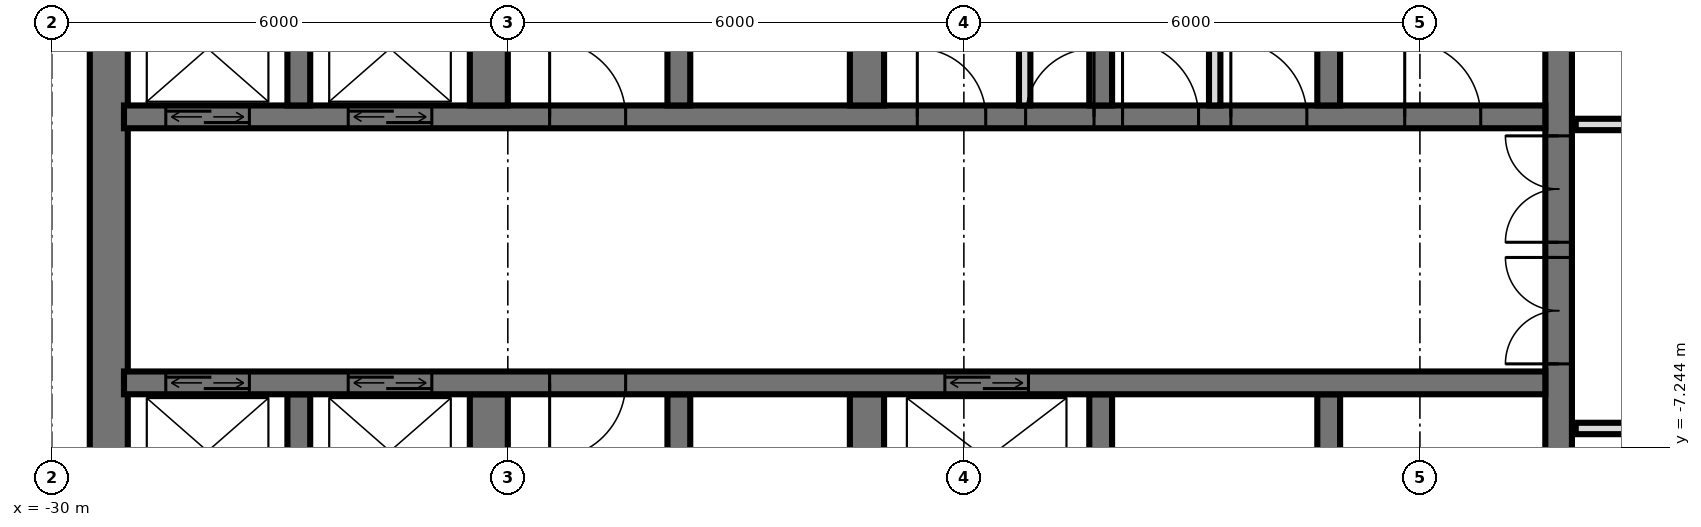
"""IFC4 building model, lengths in metres.
Left out: names, types, materials, properties, quantities, classifications, styles, units other than length and angle.
Written with IfcOpenShell. Run it as: python <this file> out.ifc"""

import sys

from ifc_helpers import new_model, si_unit, direction, frame, frame_2d, origin, place, context, subcontext, project, spatial, rectangle, extrude, element, fill, save


model = new_model("IFC4")
c1 = context("Model", 3, precision=1e-05, world=origin(), true_north=direction((0.0, 1.0)))
c2 = subcontext(c1, "Body", "Model", "MODEL_VIEW")
j1 = project(units=[si_unit("LENGTHUNIT", "METRE"), si_unit("PLANEANGLEUNIT", "RADIAN")], contexts=[c1])
p1 = place(None, origin())
s1 = spatial("IfcSite", under=j1, at=p1, CompositionType="ELEMENT")
p2 = place(p1, origin())
s2 = spatial("IfcBuilding", under=s1, at=p2, CompositionType="ELEMENT")
p3 = place(p2, frame((0.0, 0.0, 31.2)))
s3 = spatial("IfcBuildingStorey", under=s2, at=p3, CompositionType="ELEMENT", Elevation=31.2)
p4 = place(p3, frame((-10.175, -14.55, 0.0), z_axis=(0.0, 0.0, 1.0), x_axis=(0.0, 1.0, 0.0)))
e1 = element("IfcWall", 1, at=p4, inside=s3, PredefinedType="SHEAR", context=c2, shape_type="SweptSolid", body=[
    extrude(rectangle(XDim=14.1, YDim=0.35, at=frame_2d((7.05, 0.0))), origin(), (0.0, 0.0, 1.0), 3.6),
])
p5 = place(p4, frame((8.4, 0.0, 0.0)))
e2 = element("IfcOpeningElement", 2, at=p5, cuts=e1, PredefinedType="OPENING", context=c2, shape_type="SweptSolid", body=[
    extrude(rectangle(XDim=1.4, YDim=2.4, at=frame_2d((0.7, 1.2))), frame((0.0, 0.185, 0.0), z_axis=(0.0, -1.0, 0.0), x_axis=(1.0, 0.0, 0.0)), (0.0, 0.0, 1.0), 0.37),
])
p6 = place(p4, frame((10.0, 0.0, 0.0)))
e3 = element("IfcOpeningElement", 3, at=p6, cuts=e1, PredefinedType="OPENING", context=c2, shape_type="SweptSolid", body=[
    extrude(rectangle(XDim=1.4, YDim=2.4, at=frame_2d((0.7, 1.2))), frame((0.0, 0.185, 0.0), z_axis=(0.0, -1.0, 0.0), x_axis=(1.0, 0.0, 0.0)), (0.0, 0.0, 1.0), 0.37),
])
p7 = place(p4, frame((4.0, 0.0, 0.0)))
e4 = element("IfcOpeningElement", 4, at=p7, cuts=e1, PredefinedType="OPENING", context=c2, shape_type="SweptSolid", body=[
    extrude(rectangle(XDim=1.2, YDim=2.1, at=frame_2d((0.6, 1.05))), frame((0.0, 0.185, 0.0), z_axis=(0.0, -1.0, 0.0), x_axis=(1.0, 0.0, 0.0)), (0.0, 0.0, 1.0), 0.37),
])
p8 = place(p3, frame((-29.25, -14.55, 0.0), z_axis=(0.0, 0.0, 1.0), x_axis=(0.0, 1.0, 0.0)))
e5 = element("IfcWall", 5, at=p8, inside=s3, PredefinedType="SHEAR", context=c2, shape_type="SweptSolid", body=[
    extrude(rectangle(XDim=14.1, YDim=0.5, at=frame_2d((7.05, 0.0))), origin(), (0.0, 0.0, 1.0), 3.6),
])
p9 = place(p3, frame((-29.05, -2.9, 0.0), z_axis=(0.0, 0.0, 1.0), x_axis=(1.0, 0.0, 0.0)))
e6 = element("IfcWall", 6, at=p9, inside=s3, PredefinedType="SHEAR", context=c2, shape_type="SweptSolid", body=[
    extrude(rectangle(XDim=18.7, YDim=0.3, at=frame_2d((9.35, 0.0))), origin(), (0.0, 0.0, 1.0), 3.6),
])
p10 = place(p9, frame((2.95, 0.0, 0.0)))
e7 = element("IfcOpeningElement", 7, at=p10, cuts=e6, PredefinedType="OPENING", context=c2, shape_type="SweptSolid", body=[
    extrude(rectangle(XDim=1.1, YDim=2.1, at=frame_2d((0.55, 1.05))), frame((0.0, 0.16, 0.0), z_axis=(0.0, -1.0, 0.0), x_axis=(1.0, 0.0, 0.0)), (0.0, 0.0, 1.0), 0.32),
])
p11 = place(p9, frame((0.55, 0.0, 0.0)))
e8 = element("IfcOpeningElement", 8, at=p11, cuts=e6, PredefinedType="OPENING", context=c2, shape_type="SweptSolid", body=[
    extrude(rectangle(XDim=1.1, YDim=2.1, at=frame_2d((0.55, 1.05))), frame((0.0, 0.16, 0.0), z_axis=(0.0, -1.0, 0.0), x_axis=(1.0, 0.0, 0.0)), (0.0, 0.0, 1.0), 0.32),
])
p12 = place(p9, frame((11.863, 0.0, 0.0)))
e9 = element("IfcOpeningElement", 9, at=p12, cuts=e6, PredefinedType="OPENING", context=c2, shape_type="SweptSolid", body=[
    extrude(rectangle(XDim=0.9, YDim=2.1, at=frame_2d((0.45, 1.05))), frame((0.0, 0.16, 0.0), z_axis=(0.0, -1.0, 0.0), x_axis=(1.0, 0.0, 0.0)), (0.0, 0.0, 1.0), 0.32),
])
p13 = place(p9, frame((10.438, 0.0, 0.0)))
e10 = element("IfcOpeningElement", 10, at=p13, cuts=e6, PredefinedType="OPENING", context=c2, shape_type="SweptSolid", body=[
    extrude(rectangle(XDim=0.9, YDim=2.1, at=frame_2d((0.45, 1.05))), frame((0.0, 0.16, 0.0), z_axis=(0.0, -1.0, 0.0), x_axis=(1.0, 0.0, 0.0)), (0.0, 0.0, 1.0), 0.32),
])
p14 = place(p9, frame((16.85, 0.0, 0.0)))
e11 = element("IfcOpeningElement", 11, at=p14, cuts=e6, PredefinedType="OPENING", context=c2, shape_type="SweptSolid", body=[
    extrude(rectangle(XDim=1.0, YDim=2.1, at=frame_2d((0.5, 1.05))), frame((0.0, 0.16, 0.0), z_axis=(0.0, -1.0, 0.0), x_axis=(1.0, 0.0, 0.0)), (0.0, 0.0, 1.0), 0.32),
])
p15 = place(p9, frame((14.562, 0.0, 0.0)))
e12 = element("IfcOpeningElement", 12, at=p15, cuts=e6, PredefinedType="OPENING", context=c2, shape_type="SweptSolid", body=[
    extrude(rectangle(XDim=1.0, YDim=2.1, at=frame_2d((0.5, 1.05))), frame((0.0, 0.16, 0.0), z_axis=(0.0, -1.0, 0.0), x_axis=(1.0, 0.0, 0.0)), (0.0, 0.0, 1.0), 0.32),
])
p16 = place(p9, frame((13.137, 0.0, 0.0)))
e13 = element("IfcOpeningElement", 13, at=p16, cuts=e6, PredefinedType="OPENING", context=c2, shape_type="SweptSolid", body=[
    extrude(rectangle(XDim=1.0, YDim=2.1, at=frame_2d((0.5, 1.05))), frame((0.0, 0.16, 0.0), z_axis=(0.0, -1.0, 0.0), x_axis=(1.0, 0.0, 0.0)), (0.0, 0.0, 1.0), 0.32),
])
p17 = place(p9, frame((5.6, 0.0, 0.0)))
e14 = element("IfcOpeningElement", 14, at=p17, cuts=e6, PredefinedType="OPENING", context=c2, shape_type="SweptSolid", body=[
    extrude(rectangle(XDim=1.0, YDim=2.1, at=frame_2d((0.5, 1.05))), frame((0.0, 0.16, 0.0), z_axis=(0.0, -1.0, 0.0), x_axis=(1.0, 0.0, 0.0)), (0.0, 0.0, 1.0), 0.32),
])
p18 = place(p3, frame((-29.05, -6.4, 0.0), z_axis=(0.0, 0.0, 1.0), x_axis=(1.0, 0.0, 0.0)))
e15 = element("IfcWall", 15, at=p18, inside=s3, PredefinedType="SHEAR", context=c2, shape_type="SweptSolid", body=[
    extrude(rectangle(XDim=18.7, YDim=0.3, at=frame_2d((9.35, 0.0))), origin(), (0.0, 0.0, 1.0), 3.6),
])
p19 = place(p18, frame((2.95, 0.0, 0.0)))
e16 = element("IfcOpeningElement", 16, at=p19, cuts=e15, PredefinedType="OPENING", context=c2, shape_type="SweptSolid", body=[
    extrude(rectangle(XDim=1.1, YDim=2.1, at=frame_2d((0.55, 1.05))), frame((0.0, 0.16, 0.0), z_axis=(0.0, -1.0, 0.0), x_axis=(1.0, 0.0, 0.0)), (0.0, 0.0, 1.0), 0.32),
])
p20 = place(p18, frame((0.55, 0.0, 0.0)))
e17 = element("IfcOpeningElement", 17, at=p20, cuts=e15, PredefinedType="OPENING", context=c2, shape_type="SweptSolid", body=[
    extrude(rectangle(XDim=1.1, YDim=2.1, at=frame_2d((0.55, 1.05))), frame((0.0, 0.16, 0.0), z_axis=(0.0, -1.0, 0.0), x_axis=(1.0, 0.0, 0.0)), (0.0, 0.0, 1.0), 0.32),
])
p21 = place(p18, frame((10.8, 0.0, 0.0)))
e18 = element("IfcOpeningElement", 18, at=p21, cuts=e15, PredefinedType="OPENING", context=c2, shape_type="SweptSolid", body=[
    extrude(rectangle(XDim=1.1, YDim=2.1, at=frame_2d((0.55, 1.05))), frame((0.0, 0.16, 0.0), z_axis=(0.0, -1.0, 0.0), x_axis=(1.0, 0.0, 0.0)), (0.0, 0.0, 1.0), 0.32),
])
p22 = place(p18, frame((5.6, 0.0, 0.0)))
e19 = element("IfcOpeningElement", 19, at=p22, cuts=e15, PredefinedType="OPENING", context=c2, shape_type="SweptSolid", body=[
    extrude(rectangle(XDim=1.0, YDim=2.1, at=frame_2d((0.5, 1.05))), frame((0.0, 0.16, 0.0), z_axis=(0.0, -1.0, 0.0), x_axis=(1.0, 0.0, 0.0)), (0.0, 0.0, 1.0), 0.32),
])
for number, where, z_axis, x_axis in (
    (20, (-13.2, -2.75, 0.0), (0.0, 0.0, 1.0), (0.0, 1.0, 0.0)),
    (21, (-13.2, -8.85, 0.0), (0.0, 0.0, 1.0), (0.0, 1.0, 0.0)),
    (22, (-16.2, -2.75, 0.0), (0.0, 0.0, 1.0), (0.0, 1.0, 0.0)),
    (23, (-16.2, -8.85, 0.0), (0.0, 0.0, 1.0), (0.0, 1.0, 0.0)),
):
    element("IfcWall", number, at=place(p3, frame(where, z_axis=z_axis, x_axis=x_axis)), inside=s3, PredefinedType="SHEAR", context=c2, shape_type="SweptSolid", body=[
        extrude(rectangle(XDim=2.3, YDim=0.3, at=frame_2d((1.15, 0.0))), origin(), (0.0, 0.0, 1.0), 3.6),
    ])
for number, where, z_axis, x_axis in (
    (24, (-19.275, -2.75, 0.0), (0.0, 0.0, 1.0), (0.0, 1.0, 0.0)),
    (25, (-19.275, -8.85, 0.0), (0.0, 0.0, 1.0), (0.0, 1.0, 0.0)),
):
    element("IfcWall", number, at=place(p3, frame(where, z_axis=z_axis, x_axis=x_axis)), inside=s3, PredefinedType="SHEAR", context=c2, shape_type="SweptSolid", body=[
        extrude(rectangle(XDim=2.3, YDim=0.45, at=frame_2d((1.15, 0.0))), origin(), (0.0, 0.0, 1.0), 3.6),
    ])
for number, where, z_axis, x_axis in (
    (26, (-21.75, -2.75, 0.0), (0.0, 0.0, 1.0), (0.0, 1.0, 0.0)),
    (27, (-21.75, -8.85, 0.0), (0.0, 0.0, 1.0), (0.0, 1.0, 0.0)),
):
    element("IfcWall", number, at=place(p3, frame(where, z_axis=z_axis, x_axis=x_axis)), inside=s3, PredefinedType="SHEAR", context=c2, shape_type="SweptSolid", body=[
        extrude(rectangle(XDim=2.3, YDim=0.3, at=frame_2d((1.15, 0.0))), origin(), (0.0, 0.0, 1.0), 3.6),
    ])
for number, where, z_axis, x_axis in (
    (28, (-24.25, -2.75, 0.0), (0.0, 0.0, 1.0), (0.0, 1.0, 0.0)),
    (29, (-24.25, -8.85, 0.0), (0.0, 0.0, 1.0), (0.0, 1.0, 0.0)),
):
    element("IfcWall", number, at=place(p3, frame(where, z_axis=z_axis, x_axis=x_axis)), inside=s3, PredefinedType="SHEAR", context=c2, shape_type="SweptSolid", body=[
        extrude(rectangle(XDim=2.3, YDim=0.5, at=frame_2d((1.15, 0.0))), origin(), (0.0, 0.0, 1.0), 3.6),
    ])
for number, where, z_axis, x_axis in (
    (30, (-26.75, -2.75, 0.0), (0.0, 0.0, 1.0), (0.0, 1.0, 0.0)),
    (31, (-26.75, -8.85, 0.0), (0.0, 0.0, 1.0), (0.0, 1.0, 0.0)),
):
    element("IfcWall", number, at=place(p3, frame(where, z_axis=z_axis, x_axis=x_axis)), inside=s3, PredefinedType="SHEAR", context=c2, shape_type="SweptSolid", body=[
        extrude(rectangle(XDim=2.3, YDim=0.3, at=frame_2d((1.15, 0.0))), origin(), (0.0, 0.0, 1.0), 3.6),
    ])
for number, where, z_axis, x_axis in (
    (32, (-17.2, -2.75, 0.0), (0.0, 0.0, 1.0), (0.0, 1.0, 0.0)),
    (33, (-14.7, -2.75, 0.0), (0.0, 0.0, 1.0), (0.0, 1.0, 0.0)),
):
    element("IfcWall", number, at=place(p3, frame(where, z_axis=z_axis, x_axis=x_axis)), inside=s3, PredefinedType="PARTITIONING", context=c2, shape_type="SweptSolid", body=[
        extrude(rectangle(XDim=2.3, YDim=0.15, at=frame_2d((1.15, 0.0))), origin(), (0.0, 0.0, 1.0), 3.3),
    ])
p23 = place(p3, frame((-9.95, -7.0, 0.0), z_axis=(0.0, 0.0, 1.0), x_axis=(1.0, 0.0, 0.0)))
e34 = element("IfcWall", 34, at=p23, inside=s3, PredefinedType="PARTITIONING", context=c2, shape_type="SweptSolid", body=[
    extrude(rectangle(XDim=19.9, YDim=0.15, at=frame_2d((9.95, 0.0))), origin(), (0.0, 0.0, 1.0), 3.32),
])
p24 = place(p23, frame((9.45, 0.0, 0.0)))
e35 = element("IfcOpeningElement", 35, at=p24, cuts=e34, PredefinedType="OPENING", context=c2, shape_type="SweptSolid", body=[
    extrude(rectangle(XDim=1.0, YDim=2.1, at=frame_2d((0.5, 1.05))), frame((0.0, 0.085, 0.0), z_axis=(0.0, -1.0, 0.0), x_axis=(1.0, 0.0, 0.0)), (0.0, 0.0, 1.0), 0.17),
])
p25 = place(p23, frame((3.45, 0.0, 0.0)))
e36 = element("IfcOpeningElement", 36, at=p25, cuts=e34, PredefinedType="OPENING", context=c2, shape_type="SweptSolid", body=[
    extrude(rectangle(XDim=1.0, YDim=2.1, at=frame_2d((0.5, 1.05))), frame((0.0, 0.085, 0.0), z_axis=(0.0, -1.0, 0.0), x_axis=(1.0, 0.0, 0.0)), (0.0, 0.0, 1.0), 0.17),
])
p26 = place(p3, frame((-9.95, -3.0, 0.0), z_axis=(0.0, 0.0, 1.0), x_axis=(1.0, 0.0, 0.0)))
e37 = element("IfcWall", 37, at=p26, inside=s3, PredefinedType="PARTITIONING", context=c2, shape_type="SweptSolid", body=[
    extrude(rectangle(XDim=19.9, YDim=0.15, at=frame_2d((9.95, 0.0))), origin(), (0.0, 0.0, 1.0), 3.32),
])
p27 = place(p26, frame((0.95, 0.0, 0.0)))
e38 = element("IfcOpeningElement", 38, at=p27, cuts=e37, PredefinedType="OPENING", context=c2, shape_type="SweptSolid", body=[
    extrude(rectangle(XDim=1.0, YDim=2.1, at=frame_2d((0.5, 1.05))), frame((0.0, 0.085, 0.0), z_axis=(0.0, -1.0, 0.0), x_axis=(1.0, 0.0, 0.0)), (0.0, 0.0, 1.0), 0.17),
])
p28 = place(p26, frame((3.7, 0.0, 0.0)))
e39 = element("IfcOpeningElement", 39, at=p28, cuts=e37, PredefinedType="OPENING", context=c2, shape_type="SweptSolid", body=[
    extrude(rectangle(XDim=1.0, YDim=2.1, at=frame_2d((0.5, 1.05))), frame((0.0, 0.085, 0.0), z_axis=(0.0, -1.0, 0.0), x_axis=(1.0, 0.0, 0.0)), (0.0, 0.0, 1.0), 0.17),
])
p29 = place(p26, frame((8.45, 0.0, 0.0)))
e40 = element("IfcOpeningElement", 40, at=p29, cuts=e37, PredefinedType="OPENING", context=c2, shape_type="SweptSolid", body=[
    extrude(rectangle(XDim=1.0, YDim=2.1, at=frame_2d((0.5, 1.05))), frame((0.0, 0.085, 0.0), z_axis=(0.0, -1.0, 0.0), x_axis=(1.0, 0.0, 0.0)), (0.0, 0.0, 1.0), 0.17),
])
p30 = place(p26, frame((15.7, 0.0, 0.0)))
e41 = element("IfcOpeningElement", 41, at=p30, cuts=e37, PredefinedType="OPENING", context=c2, shape_type="SweptSolid", body=[
    extrude(rectangle(XDim=1.0, YDim=2.1, at=frame_2d((0.5, 1.05))), frame((0.0, 0.085, 0.0), z_axis=(0.0, -1.0, 0.0), x_axis=(1.0, 0.0, 0.0)), (0.0, 0.0, 1.0), 0.17),
])
p31 = place(p10, origin())
e42 = element("IfcDoor", 42, at=p31, inside=s3, OperationType="DOUBLE_DOOR_SLIDING", PredefinedType="USERDEFINED", context=c2, shape_type="SweptSolid", body=[
    extrude(rectangle(XDim=1.1, YDim=2.1, at=frame_2d((0.55, 1.05))), frame((0.0, 0.025, 0.0), z_axis=(0.0, -1.0, 0.0), x_axis=(1.0, 0.0, 0.0)), (0.0, 0.0, 1.0), 0.05),
])
fill(e7, e42)
p32 = place(p11, origin())
e43 = element("IfcDoor", 43, at=p32, inside=s3, OperationType="DOUBLE_DOOR_SLIDING", PredefinedType="USERDEFINED", context=c2, shape_type="SweptSolid", body=[
    extrude(rectangle(XDim=1.1, YDim=2.1, at=frame_2d((0.55, 1.05))), frame((0.0, 0.025, 0.0), z_axis=(0.0, -1.0, 0.0), x_axis=(1.0, 0.0, 0.0)), (0.0, 0.0, 1.0), 0.05),
])
fill(e8, e43)
p33 = place(p19, origin())
e44 = element("IfcDoor", 44, at=p33, inside=s3, OperationType="DOUBLE_DOOR_SLIDING", PredefinedType="USERDEFINED", context=c2, shape_type="SweptSolid", body=[
    extrude(rectangle(XDim=1.1, YDim=2.1, at=frame_2d((0.55, 1.05))), frame((0.0, 0.025, 0.0), z_axis=(0.0, -1.0, 0.0), x_axis=(1.0, 0.0, 0.0)), (0.0, 0.0, 1.0), 0.05),
])
fill(e16, e44)
p34 = place(p20, origin())
e45 = element("IfcDoor", 45, at=p34, inside=s3, OperationType="DOUBLE_DOOR_SLIDING", PredefinedType="USERDEFINED", context=c2, shape_type="SweptSolid", body=[
    extrude(rectangle(XDim=1.1, YDim=2.1, at=frame_2d((0.55, 1.05))), frame((0.0, 0.025, 0.0), z_axis=(0.0, -1.0, 0.0), x_axis=(1.0, 0.0, 0.0)), (0.0, 0.0, 1.0), 0.05),
])
fill(e17, e45)
p35 = place(p21, origin())
e46 = element("IfcDoor", 46, at=p35, inside=s3, OperationType="DOUBLE_DOOR_SLIDING", PredefinedType="USERDEFINED", context=c2, shape_type="SweptSolid", body=[
    extrude(rectangle(XDim=1.1, YDim=2.1, at=frame_2d((0.55, 1.05))), frame((0.0, 0.025, 0.0), z_axis=(0.0, -1.0, 0.0), x_axis=(1.0, 0.0, 0.0)), (0.0, 0.0, 1.0), 0.05),
])
fill(e18, e46)
p36 = place(p5, origin())
e47 = element("IfcDoor", 47, at=p36, inside=s3, OperationType="DOUBLE_DOOR_SINGLE_SWING", PredefinedType="DOOR", context=c2, shape_type="SweptSolid", body=[
    extrude(rectangle(XDim=1.4, YDim=2.4, at=frame_2d((0.7, 1.2))), frame((0.0, 0.025, 0.0), z_axis=(0.0, -1.0, 0.0), x_axis=(1.0, 0.0, 0.0)), (0.0, 0.0, 1.0), 0.05),
])
fill(e2, e47)
p37 = place(p6, origin())
e48 = element("IfcDoor", 48, at=p37, inside=s3, OperationType="DOUBLE_DOOR_SINGLE_SWING", PredefinedType="DOOR", context=c2, shape_type="SweptSolid", body=[
    extrude(rectangle(XDim=1.4, YDim=2.4, at=frame_2d((0.7, 1.2))), frame((0.0, 0.025, 0.0), z_axis=(0.0, -1.0, 0.0), x_axis=(1.0, 0.0, 0.0)), (0.0, 0.0, 1.0), 0.05),
])
fill(e3, e48)
p38 = place(p12, origin())
e49 = element("IfcDoor", 49, at=p38, inside=s3, OperationType="SINGLE_SWING_LEFT", PredefinedType="DOOR", context=c2, shape_type="SweptSolid", body=[
    extrude(rectangle(XDim=0.9, YDim=2.1, at=frame_2d((0.45, 1.05))), frame((0.0, 0.025, 0.0), z_axis=(0.0, -1.0, 0.0), x_axis=(1.0, 0.0, 0.0)), (0.0, 0.0, 1.0), 0.05),
])
fill(e9, e49)
p39 = place(p13, origin())
e50 = element("IfcDoor", 50, at=p39, inside=s3, OperationType="SINGLE_SWING_RIGHT", PredefinedType="DOOR", context=c2, shape_type="SweptSolid", body=[
    extrude(rectangle(XDim=0.9, YDim=2.1, at=frame_2d((0.45, 1.05))), frame((0.0, 0.025, 0.0), z_axis=(0.0, -1.0, 0.0), x_axis=(1.0, 0.0, 0.0)), (0.0, 0.0, 1.0), 0.05),
])
fill(e10, e50)
p40 = place(p14, origin())
e51 = element("IfcDoor", 51, at=p40, inside=s3, OperationType="SINGLE_SWING_RIGHT", PredefinedType="DOOR", context=c2, shape_type="SweptSolid", body=[
    extrude(rectangle(XDim=1.0, YDim=2.1, at=frame_2d((0.5, 1.05))), frame((0.0, 0.025, 0.0), z_axis=(0.0, -1.0, 0.0), x_axis=(1.0, 0.0, 0.0)), (0.0, 0.0, 1.0), 0.05),
])
fill(e11, e51)
p41 = place(p15, origin())
e52 = element("IfcDoor", 52, at=p41, inside=s3, OperationType="SINGLE_SWING_RIGHT", PredefinedType="DOOR", context=c2, shape_type="SweptSolid", body=[
    extrude(rectangle(XDim=1.0, YDim=2.1, at=frame_2d((0.5, 1.05))), frame((0.0, 0.025, 0.0), z_axis=(0.0, -1.0, 0.0), x_axis=(1.0, 0.0, 0.0)), (0.0, 0.0, 1.0), 0.05),
])
fill(e12, e52)
p42 = place(p16, origin())
e53 = element("IfcDoor", 53, at=p42, inside=s3, OperationType="SINGLE_SWING_RIGHT", PredefinedType="DOOR", context=c2, shape_type="SweptSolid", body=[
    extrude(rectangle(XDim=1.0, YDim=2.1, at=frame_2d((0.5, 1.05))), frame((0.0, 0.025, 0.0), z_axis=(0.0, -1.0, 0.0), x_axis=(1.0, 0.0, 0.0)), (0.0, 0.0, 1.0), 0.05),
])
fill(e13, e53)
p43 = place(p17, origin())
e54 = element("IfcDoor", 54, at=p43, inside=s3, OperationType="SINGLE_SWING_RIGHT", PredefinedType="DOOR", context=c2, shape_type="SweptSolid", body=[
    extrude(rectangle(XDim=1.0, YDim=2.1, at=frame_2d((0.5, 1.05))), frame((0.0, 0.025, 0.0), z_axis=(0.0, -1.0, 0.0), x_axis=(1.0, 0.0, 0.0)), (0.0, 0.0, 1.0), 0.05),
])
fill(e14, e54)
p44 = place(p22, frame((0.5, 0.0, 0.0), z_axis=(0.0, 0.0, 1.0), x_axis=(-1.0, 0.0, 0.0)))
e55 = element("IfcDoor", 55, at=p44, inside=s3, OperationType="SINGLE_SWING_LEFT", PredefinedType="DOOR", context=c2, shape_type="SweptSolid", body=[
    extrude(rectangle(XDim=1.0, YDim=2.1, at=frame_2d((0.0, 1.05))), frame((0.0, -0.025, 0.0), z_axis=(0.0, 1.0, 0.0), x_axis=(-1.0, 0.0, 0.0)), (0.0, 0.0, 1.0), 0.05),
])
fill(e19, e55)
save(model, sys.argv[1])
